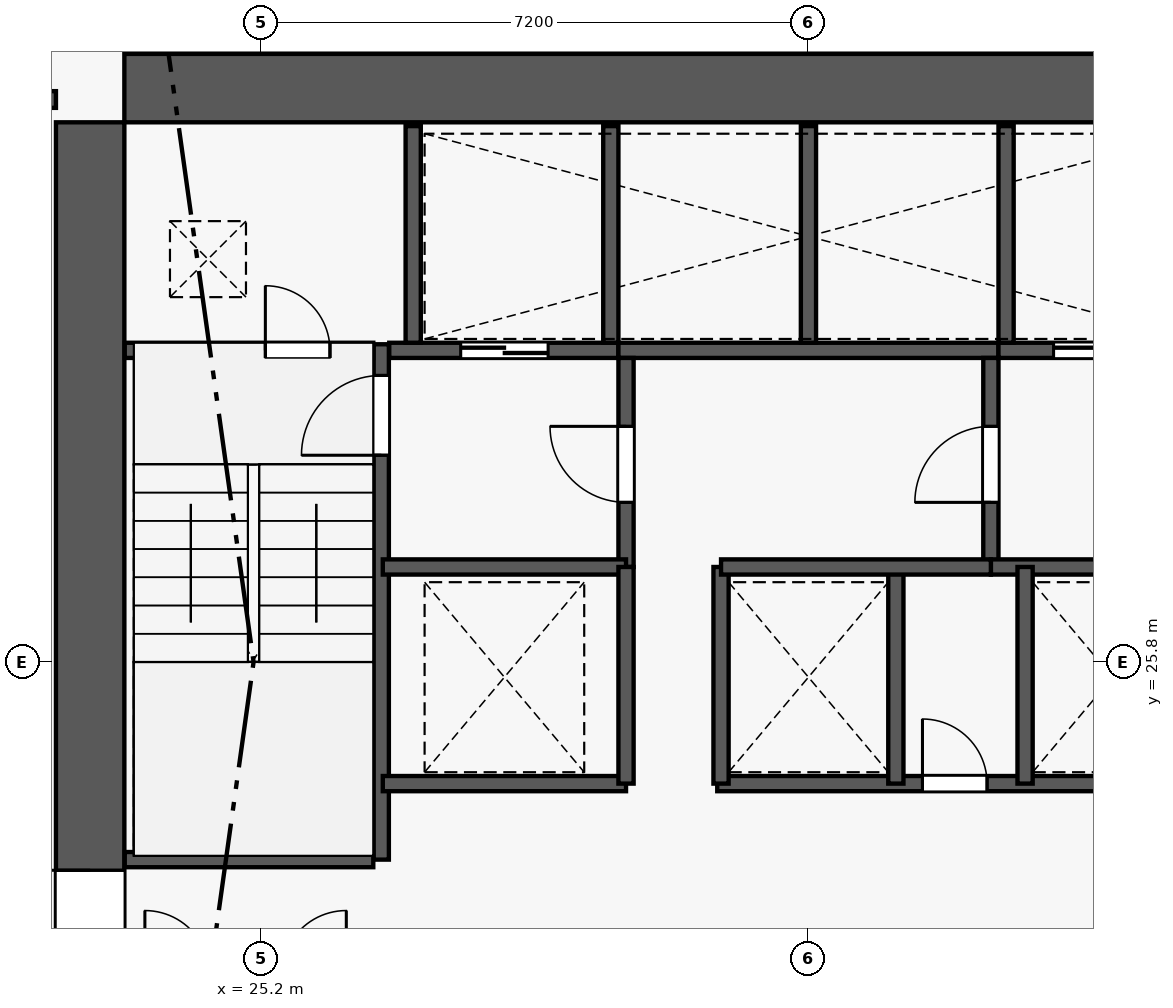
"""IFC4 building model, lengths in metres.
Left out: names, types, materials, properties, quantities, classifications, styles, units other than length and angle.
Written with IfcOpenShell. Run it as: python <this file> out.ifc"""

import sys

from ifc_helpers import new_model, si_unit, direction, frame, frame_2d, origin, origin_2d, place, context, subcontext, project, spatial, rectangle, extrude, element, fill, save


model = new_model("IFC4")
c1 = context("Model", 3, precision=1e-05, world=origin(), true_north=direction((0.0, 1.0)))
c2 = subcontext(c1, "Body", "Model", "MODEL_VIEW")
j1 = project(units=[si_unit("LENGTHUNIT", "METRE"), si_unit("PLANEANGLEUNIT", "RADIAN")], contexts=[c1])
p1 = place(None, origin())
s1 = spatial("IfcSite", under=j1, at=p1, CompositionType="ELEMENT")
p2 = place(p1, origin())
s2 = spatial("IfcBuilding", under=s1, at=p2, CompositionType="ELEMENT")
p3 = place(p2, frame((0.0, 0.0, 19.5)))
s3 = spatial("IfcBuildingStorey", under=s2, at=p3, CompositionType="ELEMENT", Elevation=19.5)
p4 = place(p3, frame((22.95, 33.35, 0.0), z_axis=(0.0, 0.0, 1.0), x_axis=(1.0, 0.0, 0.0)))
e1 = element("IfcColumn", 1, at=p4, inside=s3, PredefinedType="COLUMN", context=c2, shape_type="SweptSolid", body=[
    extrude(rectangle(XDim=0.9, YDim=0.9, at=origin_2d()), origin(), (0.0, 0.0, 1.0), 5.4),
])
p5 = place(p3, frame((23.4, 33.35, 0.0), z_axis=(0.0, 0.0, 1.0), x_axis=(1.0, 0.0, 0.0)))
e2 = element("IfcWall", 2, at=p5, inside=s3, PredefinedType="SHEAR", context=c2, shape_type="SweptSolid", body=[
    extrude(rectangle(XDim=18.0, YDim=0.9, at=frame_2d((9.0, 0.0))), origin(), (0.0, 0.0, 1.0), 5.18),
])
p6 = place(p3, frame((22.95, 18.9, 0.0), z_axis=(0.0, 0.0, 1.0), x_axis=(0.0, 1.0, 0.0)))
e3 = element("IfcWall", 3, at=p6, inside=s3, PredefinedType="SHEAR", context=c2, shape_type="SweptSolid", body=[
    extrude(rectangle(XDim=14.0, YDim=0.9, at=frame_2d((7.0, 0.0))), origin(), (0.0, 0.0, 1.0), 5.18),
])
p7 = place(p6, frame((2.94, 0.0, 0.0)))
e4 = element("IfcOpeningElement", 4, at=p7, cuts=e3, PredefinedType="OPENING", context=c2, shape_type="SweptSolid", body=[
    extrude(rectangle(XDim=1.22, YDim=2.25, at=frame_2d((0.61, 1.125))), frame((0.0, 0.46, 0.0), z_axis=(0.0, -1.0, 0.0), x_axis=(1.0, 0.0, 0.0)), (0.0, 0.0, 1.0), 0.92),
])
p8 = place(p3, frame((26.78, 23.2, 0.0), z_axis=(0.0, 0.0, 1.0), x_axis=(0.0, 1.0, 0.0)))
e5 = element("IfcWall", 5, at=p8, inside=s3, PredefinedType="SHEAR", context=c2, shape_type="SweptSolid", body=[
    extrude(rectangle(XDim=6.78, YDim=0.2, at=frame_2d((3.39, 0.0))), origin(), (0.0, 0.0, 1.0), 5.4),
])
p9 = place(p8, frame((5.32, 0.0, 0.0)))
e6 = element("IfcOpeningElement", 6, at=p9, cuts=e5, PredefinedType="OPENING", context=c2, shape_type="SweptSolid", body=[
    extrude(rectangle(XDim=1.05, YDim=2.15, at=frame_2d((0.525, 1.075))), frame((0.0, 0.11, 0.0), z_axis=(0.0, -1.0, 0.0), x_axis=(1.0, 0.0, 0.0)), (0.0, 0.0, 1.0), 0.22),
])
p10 = place(p3, frame((23.405, 23.2, 0.0), z_axis=(0.0, 0.0, 1.0), x_axis=(1.0, 0.0, 0.0)))
e7 = element("IfcWall", 7, at=p10, inside=s3, PredefinedType="PLUMBINGWALL", context=c2, shape_type="SweptSolid", body=[
    extrude(rectangle(XDim=3.27, YDim=0.2, at=frame_2d((1.635, 0.0))), origin(), (0.0, 0.0, 1.0), 5.18),
])
p11 = place(p3, frame((23.405, 29.9, 0.0), z_axis=(0.0, 0.0, 1.0), x_axis=(1.0, 0.0, 0.0)))
e8 = element("IfcWall", 8, at=p11, inside=s3, PredefinedType="PLUMBINGWALL", context=c2, shape_type="SweptSolid", body=[
    extrude(rectangle(XDim=3.27, YDim=0.2, at=frame_2d((1.635, 0.0))), origin(), (0.0, 0.0, 1.0), 5.18),
])
p12 = place(p11, frame((1.85, 0.0, 0.0)))
e9 = element("IfcOpeningElement", 9, at=p12, cuts=e8, PredefinedType="OPENING", context=c2, shape_type="SweptSolid", body=[
    extrude(rectangle(XDim=0.85, YDim=2.05, at=frame_2d((0.425, 1.025))), frame((0.0, 0.11, 0.0), z_axis=(0.0, -1.0, 0.0), x_axis=(1.0, 0.0, 0.0)), (0.0, 0.0, 1.0), 0.22),
])
p13 = place(p3, frame((26.885, 29.9, 0.0), z_axis=(0.0, 0.0, 1.0), x_axis=(1.0, 0.0, 0.0)))
e10 = element("IfcWall", 10, at=p13, inside=s3, PredefinedType="PLUMBINGWALL", context=c2, shape_type="SweptSolid", body=[
    extrude(rectangle(XDim=3.015, YDim=0.2, at=frame_2d((1.507, 0.0))), origin(), (0.0, 0.0, 1.0), 5.18),
])
p14 = place(p13, frame((0.94, 0.0, 0.0)))
e11 = element("IfcOpeningElement", 11, at=p14, cuts=e10, PredefinedType="OPENING", context=c2, shape_type="SweptSolid", body=[
    extrude(rectangle(XDim=1.15, YDim=2.2, at=frame_2d((0.575, 1.1))), frame((0.0, 0.11, 0.0), z_axis=(0.0, -1.0, 0.0), x_axis=(1.0, 0.0, 0.0)), (0.0, 0.0, 1.0), 0.22),
])
p15 = place(p3, frame((29.9, 29.9, 0.0), z_axis=(0.0, 0.0, 1.0), x_axis=(1.0, 0.0, 0.0)))
e12 = element("IfcWall", 12, at=p15, inside=s3, PredefinedType="PLUMBINGWALL", context=c2, shape_type="SweptSolid", body=[
    extrude(rectangle(XDim=5.0, YDim=0.2, at=frame_2d((2.5, 0.0))), origin(), (0.0, 0.0, 1.0), 5.18),
])
p16 = place(p3, frame((34.9, 29.9, 0.0), z_axis=(0.0, 0.0, 1.0), x_axis=(1.0, 0.0, 0.0)))
e13 = element("IfcWall", 13, at=p16, inside=s3, PredefinedType="PLUMBINGWALL", context=c2, shape_type="SweptSolid", body=[
    extrude(rectangle(XDim=3.015, YDim=0.2, at=frame_2d((1.508, 0.0))), origin(), (0.0, 0.0, 1.0), 5.18),
])
p17 = place(p16, frame((0.725, 0.0, 0.0)))
e14 = element("IfcOpeningElement", 14, at=p17, cuts=e13, PredefinedType="OPENING", context=c2, shape_type="SweptSolid", body=[
    extrude(rectangle(XDim=1.15, YDim=2.2, at=frame_2d((0.575, 1.1))), frame((0.0, 0.11, 0.0), z_axis=(0.0, -1.0, 0.0), x_axis=(1.0, 0.0, 0.0)), (0.0, 0.0, 1.0), 0.22),
])
for number, where, z_axis, x_axis in (
    (15, (27.2, 30.0, 0.0), (0.0, 0.0, 1.0), (0.0, 1.0, 0.0)),
    (16, (29.8, 30.0, 0.0), (0.0, 0.0, 1.0), (0.0, 1.0, 0.0)),
    (17, (32.4, 30.0, 0.0), (0.0, 0.0, 1.0), (0.0, 1.0, 0.0)),
    (18, (35.0, 30.0, 0.0), (0.0, 0.0, 1.0), (0.0, 1.0, 0.0)),
):
    element("IfcWall", number, at=place(p3, frame(where, z_axis=z_axis, x_axis=x_axis)), inside=s3, PredefinedType="PLUMBINGWALL", context=c2, shape_type="SweptSolid", body=[
        extrude(rectangle(XDim=2.85, YDim=0.2, at=frame_2d((1.425, 0.0))), origin(), (0.0, 0.0, 1.0), 5.18),
    ])
p18 = place(p3, frame((30.0, 27.05, 0.0), z_axis=(0.0, 0.0, 1.0), x_axis=(0.0, 1.0, 0.0)))
e19 = element("IfcWall", 19, at=p18, inside=s3, PredefinedType="PLUMBINGWALL", context=c2, shape_type="SweptSolid", body=[
    extrude(rectangle(XDim=2.75, YDim=0.2, at=frame_2d((1.375, 0.0))), origin(), (0.0, 0.0, 1.0), 5.18),
])
p19 = place(p18, frame((0.85, 0.0, 0.0)))
e20 = element("IfcOpeningElement", 20, at=p19, cuts=e19, PredefinedType="OPENING", context=c2, shape_type="SweptSolid", body=[
    extrude(rectangle(XDim=1.0, YDim=2.15, at=frame_2d((0.5, 1.075))), frame((0.0, 0.11, 0.0), z_axis=(0.0, -1.0, 0.0), x_axis=(1.0, 0.0, 0.0)), (0.0, 0.0, 1.0), 0.22),
])
p20 = place(p3, frame((26.8, 27.05, 0.0), z_axis=(0.0, 0.0, 1.0), x_axis=(1.0, 0.0, 0.0)))
e21 = element("IfcWall", 21, at=p20, inside=s3, PredefinedType="PLUMBINGWALL", context=c2, shape_type="SweptSolid", body=[
    extrude(rectangle(XDim=3.2, YDim=0.2, at=frame_2d((1.6, 0.0))), origin(), (0.0, 0.0, 1.0), 5.18),
])
p21 = place(p3, frame((34.8, 27.05, 0.0), z_axis=(0.0, 0.0, 1.0), x_axis=(0.0, 1.0, 0.0)))
e22 = element("IfcWall", 22, at=p21, inside=s3, PredefinedType="PLUMBINGWALL", context=c2, shape_type="SweptSolid", body=[
    extrude(rectangle(XDim=2.75, YDim=0.2, at=frame_2d((1.375, 0.0))), origin(), (0.0, 0.0, 1.0), 5.18),
])
p22 = place(p21, frame((0.85, 0.0, 0.0)))
e23 = element("IfcOpeningElement", 23, at=p22, cuts=e22, PredefinedType="OPENING", context=c2, shape_type="SweptSolid", body=[
    extrude(rectangle(XDim=1.0, YDim=2.15, at=frame_2d((0.5, 1.075))), frame((0.0, 0.11, 0.0), z_axis=(0.0, -1.0, 0.0), x_axis=(1.0, 0.0, 0.0)), (0.0, 0.0, 1.0), 0.22),
])
for number, where, z_axis, x_axis in (
    (24, (34.8, 27.05, 0.0), (0.0, 0.0, 1.0), (1.0, 0.0, 0.0)),
    (25, (26.8, 24.2, 0.0), (0.0, 0.0, 1.0), (1.0, 0.0, 0.0)),
):
    element("IfcWall", number, at=place(p3, frame(where, z_axis=z_axis, x_axis=x_axis)), inside=s3, PredefinedType="PLUMBINGWALL", context=c2, shape_type="SweptSolid", body=[
        extrude(rectangle(XDim=3.2, YDim=0.2, at=frame_2d((1.6, 0.0))), origin(), (0.0, 0.0, 1.0), 5.18),
    ])
p23 = place(p3, frame((30.0, 24.2, 0.0), z_axis=(0.0, 0.0, 1.0), x_axis=(0.0, 1.0, 0.0)))
e26 = element("IfcWall", 26, at=p23, inside=s3, PredefinedType="PLUMBINGWALL", context=c2, shape_type="SweptSolid", body=[
    extrude(rectangle(XDim=2.85, YDim=0.2, at=frame_2d((1.425, 0.0))), origin(), (0.0, 0.0, 1.0), 5.18),
])
p24 = place(p3, frame((31.2, 24.2, 0.0), z_axis=(0.0, 0.0, 1.0), x_axis=(1.0, 0.0, 0.0)))
e27 = element("IfcWall", 27, at=p24, inside=s3, PredefinedType="PLUMBINGWALL", context=c2, shape_type="SweptSolid", body=[
    extrude(rectangle(XDim=6.8, YDim=0.2, at=frame_2d((3.4, 0.0))), origin(), (0.0, 0.0, 1.0), 5.18),
])
p25 = place(p24, frame((2.7, 0.0, 0.0)))
e28 = element("IfcOpeningElement", 28, at=p25, cuts=e27, PredefinedType="OPENING", context=c2, shape_type="SweptSolid", body=[
    extrude(rectangle(XDim=0.85, YDim=2.05, at=frame_2d((0.425, 1.025))), frame((0.0, 0.11, 0.0), z_axis=(0.0, -1.0, 0.0), x_axis=(1.0, 0.0, 0.0)), (0.0, 0.0, 1.0), 0.22),
])
for number, where, z_axis, x_axis in (
    (29, (31.25, 24.2, 0.0), (0.0, 0.0, 1.0), (0.0, 1.0, 0.0)),
    (30, (33.55, 24.2, 0.0), (0.0, 0.0, 1.0), (0.0, 1.0, 0.0)),
    (31, (35.25, 24.2, 0.0), (0.0, 0.0, 1.0), (0.0, 1.0, 0.0)),
):
    element("IfcWall", number, at=place(p3, frame(where, z_axis=z_axis, x_axis=x_axis)), inside=s3, PredefinedType="PLUMBINGWALL", context=c2, shape_type="SweptSolid", body=[
        extrude(rectangle(XDim=2.85, YDim=0.2, at=frame_2d((1.425, 0.0))), origin(), (0.0, 0.0, 1.0), 5.18),
    ])
p26 = place(p3, frame((31.25, 27.05, 0.0), z_axis=(0.0, 0.0, 1.0), x_axis=(1.0, 0.0, 0.0)))
e32 = element("IfcWall", 32, at=p26, inside=s3, PredefinedType="PLUMBINGWALL", context=c2, shape_type="SweptSolid", body=[
    extrude(rectangle(XDim=3.55, YDim=0.2, at=frame_2d((1.775, 0.0))), origin(), (0.0, 0.0, 1.0), 5.18),
])
p27 = place(p3, frame((6.925, 33.2, 0.0), z_axis=(0.0, 0.0, 1.0), x_axis=(1.0, 0.0, 0.0)))
e33 = element("IfcWall", 33, at=p27, inside=s3, PredefinedType="PARTITIONING", context=c2, shape_type="SweptSolid", body=[
    extrude(rectangle(XDim=15.575, YDim=0.22, at=frame_2d((7.788, 0.0))), origin(), (0.0, 0.0, 1.0), 3.79),
])
p28 = place(p27, frame((13.925, 0.0, 0.0)))
e34 = element("IfcOpeningElement", 34, at=p28, cuts=e33, PredefinedType="OPENING", context=c2, shape_type="SweptSolid", body=[
    extrude(rectangle(XDim=1.0, YDim=2.15, at=frame_2d((0.5, 1.075))), frame((0.0, 0.12, 0.0), z_axis=(0.0, -1.0, 0.0), x_axis=(1.0, 0.0, 0.0)), (0.0, 0.0, 1.0), 0.24),
])
p29 = place(p7, origin())
e35 = element("IfcDoor", 35, at=p29, inside=s3, OperationType="SINGLE_SWING_RIGHT", PredefinedType="DOOR", context=c2, shape_type="SweptSolid", body=[
    extrude(rectangle(XDim=1.22, YDim=2.25, at=frame_2d((0.61, 1.125))), frame((0.0, 0.025, 0.0), z_axis=(0.0, -1.0, 0.0), x_axis=(1.0, 0.0, 0.0)), (0.0, 0.0, 1.0), 0.05),
])
fill(e4, e35)
p30 = place(p9, origin())
e36 = element("IfcDoor", 36, at=p30, inside=s3, OperationType="SINGLE_SWING_LEFT", PredefinedType="DOOR", context=c2, shape_type="SweptSolid", body=[
    extrude(rectangle(XDim=1.05, YDim=2.15, at=frame_2d((0.525, 1.075))), frame((0.0, 0.025, 0.0), z_axis=(0.0, -1.0, 0.0), x_axis=(1.0, 0.0, 0.0)), (0.0, 0.0, 1.0), 0.05),
])
fill(e6, e36)
p31 = place(p12, origin())
e37 = element("IfcDoor", 37, at=p31, inside=s3, OperationType="SINGLE_SWING_LEFT", PredefinedType="DOOR", context=c2, shape_type="SweptSolid", body=[
    extrude(rectangle(XDim=0.85, YDim=2.05, at=frame_2d((0.425, 1.025))), frame((0.0, 0.025, 0.0), z_axis=(0.0, -1.0, 0.0), x_axis=(1.0, 0.0, 0.0)), (0.0, 0.0, 1.0), 0.05),
])
fill(e9, e37)
p32 = place(p14, origin())
e38 = element("IfcDoor", 38, at=p32, inside=s3, OperationType="DOUBLE_DOOR_SLIDING", PredefinedType="DOOR", context=c2, shape_type="SweptSolid", body=[
    extrude(rectangle(XDim=1.15, YDim=2.2, at=frame_2d((0.575, 1.1))), frame((0.0, 0.025, 0.0), z_axis=(0.0, -1.0, 0.0), x_axis=(1.0, 0.0, 0.0)), (0.0, 0.0, 1.0), 0.05),
])
fill(e11, e38)
p33 = place(p17, origin())
e39 = element("IfcDoor", 39, at=p33, inside=s3, OperationType="DOUBLE_DOOR_SLIDING", PredefinedType="DOOR", context=c2, shape_type="SweptSolid", body=[
    extrude(rectangle(XDim=1.15, YDim=2.2, at=frame_2d((0.575, 1.1))), frame((0.0, 0.025, 0.0), z_axis=(0.0, -1.0, 0.0), x_axis=(1.0, 0.0, 0.0)), (0.0, 0.0, 1.0), 0.05),
])
fill(e14, e39)
p34 = place(p19, origin())
e40 = element("IfcDoor", 40, at=p34, inside=s3, OperationType="SINGLE_SWING_RIGHT", PredefinedType="DOOR", context=c2, shape_type="SweptSolid", body=[
    extrude(rectangle(XDim=1.0, YDim=2.15, at=frame_2d((0.5, 1.075))), frame((0.0, 0.025, 0.0), z_axis=(0.0, -1.0, 0.0), x_axis=(1.0, 0.0, 0.0)), (0.0, 0.0, 1.0), 0.05),
])
fill(e20, e40)
p35 = place(p22, origin())
e41 = element("IfcDoor", 41, at=p35, inside=s3, OperationType="SINGLE_SWING_LEFT", PredefinedType="DOOR", context=c2, shape_type="SweptSolid", body=[
    extrude(rectangle(XDim=1.0, YDim=2.15, at=frame_2d((0.5, 1.075))), frame((0.0, 0.025, 0.0), z_axis=(0.0, -1.0, 0.0), x_axis=(1.0, 0.0, 0.0)), (0.0, 0.0, 1.0), 0.05),
])
fill(e23, e41)
p36 = place(p25, origin())
e42 = element("IfcDoor", 42, at=p36, inside=s3, OperationType="SINGLE_SWING_LEFT", PredefinedType="DOOR", context=c2, shape_type="SweptSolid", body=[
    extrude(rectangle(XDim=0.85, YDim=2.05, at=frame_2d((0.425, 1.025))), frame((0.0, 0.025, 0.0), z_axis=(0.0, -1.0, 0.0), x_axis=(1.0, 0.0, 0.0)), (0.0, 0.0, 1.0), 0.05),
])
fill(e28, e42)
save(model, sys.argv[1])
